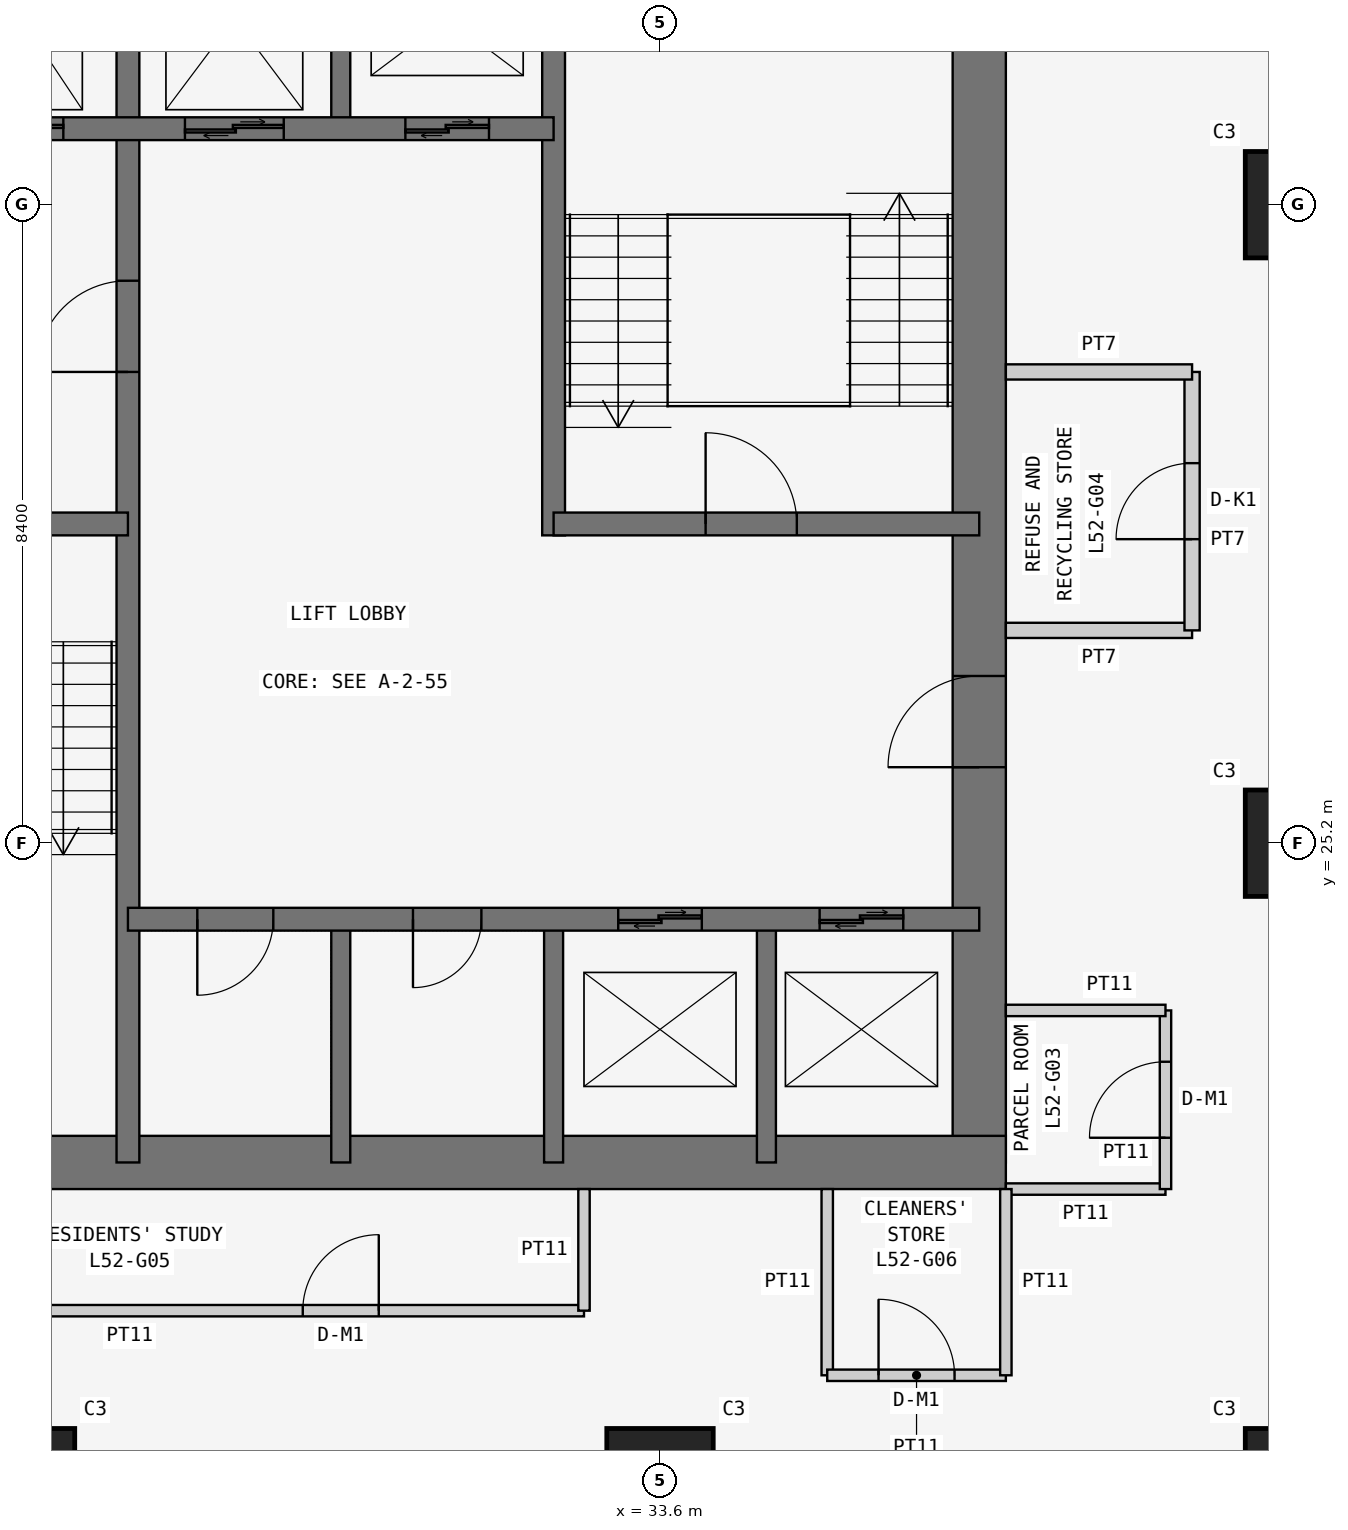
"""IFC4 building model, lengths in metres.
Left out: names, types, materials, properties, quantities, classifications, styles, units other than length and angle.
Written with IfcOpenShell. Run it as: python <this file> out.ifc"""

import sys

from ifc_helpers import new_model, si_unit, direction, frame, frame_2d, origin, origin_2d, place, context, subcontext, project, spatial, rectangle, extrude, element, fill, save


model = new_model("IFC4")
c1 = context("Model", 3, precision=1e-05, world=origin(), true_north=direction((0.0, 1.0)))
c2 = subcontext(c1, "Body", "Model", "MODEL_VIEW")
j1 = project(units=[si_unit("LENGTHUNIT", "METRE"), si_unit("PLANEANGLEUNIT", "RADIAN")], contexts=[c1])
p1 = place(None, origin())
s1 = spatial("IfcSite", under=j1, at=p1, CompositionType="ELEMENT")
p2 = place(p1, origin())
s2 = spatial("IfcBuilding", under=s1, at=p2, CompositionType="ELEMENT")
p3 = place(p2, frame((0.0, 0.0, 201.3)))
s3 = spatial("IfcBuildingStorey", under=s2, at=p3, CompositionType="ELEMENT", Elevation=201.3)
for number, where, z_axis, x_axis in (
    (1, (25.2, 16.8, 0.0), (0.0, 0.0, 1.0), (1.0, 0.0, 0.0)),
    (2, (33.6, 16.8, 0.0), (0.0, 0.0, 1.0), (1.0, 0.0, 0.0)),
    (3, (42.0, 16.8, 0.0), (0.0, 0.0, 1.0), (1.0, 0.0, 0.0)),
    (4, (42.0, 25.2, 0.0), (0.0, 0.0, 1.0), (1.0, 0.0, 0.0)),
    (5, (42.0, 33.6, 0.0), (0.0, 0.0, 1.0), (1.0, 0.0, 0.0)),
):
    element("IfcColumn", number, at=place(p3, frame(where, z_axis=z_axis, x_axis=x_axis)), inside=s3, PredefinedType="COLUMN", context=c2, shape_type="SweptSolid", body=[
        extrude(rectangle(XDim=1.4, YDim=1.4, at=origin_2d()), origin(), (0.0, 0.0, 1.0), 3.6),
    ])
p4 = place(p3, frame((21.0, 21.0, 0.0), z_axis=(0.0, 0.0, 1.0), x_axis=(1.0, 0.0, 0.0)))
e6 = element("IfcWall", 6, at=p4, inside=s3, PredefinedType="SHEAR", context=c2, shape_type="SweptSolid", body=[
    extrude(rectangle(XDim=17.15, YDim=0.7, at=frame_2d((8.575, 0.0))), origin(), (0.0, 0.0, 1.0), 3.6),
])
p5 = place(p3, frame((37.8, 21.0, 0.0), z_axis=(0.0, 0.0, 1.0), x_axis=(0.0, 1.0, 0.0)))
e7 = element("IfcWall", 7, at=p5, inside=s3, PredefinedType="SHEAR", context=c2, shape_type="SweptSolid", body=[
    extrude(rectangle(XDim=17.15, YDim=0.7, at=frame_2d((8.575, 0.0))), origin(), (0.0, 0.0, 1.0), 3.6),
])
p6 = place(p5, frame((5.2, 0.0, 0.0)))
e8 = element("IfcOpeningElement", 8, at=p6, cuts=e7, PredefinedType="OPENING", context=c2, shape_type="SweptSolid", body=[
    extrude(rectangle(XDim=1.2, YDim=2.1, at=frame_2d((0.6, 1.05))), frame((0.0, 0.36, 0.0), z_axis=(0.0, -1.0, 0.0), x_axis=(1.0, 0.0, 0.0)), (0.0, 0.0, 1.0), 0.72),
])
p7 = place(p3, frame((26.6, 21.0, 0.0), z_axis=(0.0, 0.0, 1.0), x_axis=(0.0, 1.0, 0.0)))
e9 = element("IfcWall", 9, at=p7, inside=s3, PredefinedType="SHEAR", context=c2, shape_type="SweptSolid", body=[
    extrude(rectangle(XDim=16.8, YDim=0.3, at=frame_2d((8.4, 0.0))), origin(), (0.0, 0.0, 1.0), 3.6),
])
p8 = place(p7, frame((10.4, 0.0, 0.0)))
e10 = element("IfcOpeningElement", 10, at=p8, cuts=e9, PredefinedType="OPENING", context=c2, shape_type="SweptSolid", body=[
    extrude(rectangle(XDim=1.2, YDim=2.1, at=frame_2d((0.6, 1.05))), frame((0.0, 0.16, 0.0), z_axis=(0.0, -1.0, 0.0), x_axis=(1.0, 0.0, 0.0)), (0.0, 0.0, 1.0), 0.32),
])
p9 = place(p3, frame((21.0, 29.4, 0.0), z_axis=(0.0, 0.0, 1.0), x_axis=(1.0, 0.0, 0.0)))
e11 = element("IfcWall", 11, at=p9, inside=s3, PredefinedType="SHEAR", context=c2, shape_type="SweptSolid", body=[
    extrude(rectangle(XDim=5.6, YDim=0.3, at=frame_2d((2.8, 0.0))), origin(), (0.0, 0.0, 1.0), 3.6),
])
p10 = place(p9, frame((2.3, 0.0, 0.0)))
e12 = element("IfcOpeningElement", 12, at=p10, cuts=e11, PredefinedType="OPENING", context=c2, shape_type="SweptSolid", body=[
    extrude(rectangle(XDim=1.2, YDim=2.1, at=frame_2d((0.6, 1.05))), frame((0.0, 0.16, 0.0), z_axis=(0.0, -1.0, 0.0), x_axis=(1.0, 0.0, 0.0)), (0.0, 0.0, 1.0), 0.32),
])
p11 = place(p3, frame((21.0, 34.6, 0.0), z_axis=(0.0, 0.0, 1.0), x_axis=(1.0, 0.0, 0.0)))
e13 = element("IfcWall", 13, at=p11, inside=s3, PredefinedType="SHEAR", context=c2, shape_type="SweptSolid", body=[
    extrude(rectangle(XDim=11.2, YDim=0.3, at=frame_2d((5.6, 0.0))), origin(), (0.0, 0.0, 1.0), 3.6),
])
p12 = place(p11, frame((9.25, 0.0, 0.0)))
e14 = element("IfcOpeningElement", 14, at=p12, cuts=e13, PredefinedType="OPENING", context=c2, shape_type="SweptSolid", body=[
    extrude(rectangle(XDim=1.1, YDim=2.1, at=frame_2d((0.55, 1.05))), frame((0.0, 0.16, 0.0), z_axis=(0.0, -1.0, 0.0), x_axis=(1.0, 0.0, 0.0)), (0.0, 0.0, 1.0), 0.32),
])
p13 = place(p11, frame((1.0, 0.0, 0.0)))
e15 = element("IfcOpeningElement", 15, at=p13, cuts=e13, PredefinedType="OPENING", context=c2, shape_type="SweptSolid", body=[
    extrude(rectangle(XDim=1.1, YDim=2.1, at=frame_2d((0.55, 1.05))), frame((0.0, 0.16, 0.0), z_axis=(0.0, -1.0, 0.0), x_axis=(1.0, 0.0, 0.0)), (0.0, 0.0, 1.0), 0.32),
])
p14 = place(p11, frame((3.65, 0.0, 0.0)))
e16 = element("IfcOpeningElement", 16, at=p14, cuts=e13, PredefinedType="OPENING", context=c2, shape_type="SweptSolid", body=[
    extrude(rectangle(XDim=1.1, YDim=2.1, at=frame_2d((0.55, 1.05))), frame((0.0, 0.16, 0.0), z_axis=(0.0, -1.0, 0.0), x_axis=(1.0, 0.0, 0.0)), (0.0, 0.0, 1.0), 0.32),
])
p15 = place(p11, frame((6.35, 0.0, 0.0)))
e17 = element("IfcOpeningElement", 17, at=p15, cuts=e13, PredefinedType="OPENING", context=c2, shape_type="SweptSolid", body=[
    extrude(rectangle(XDim=1.3, YDim=2.1, at=frame_2d((0.65, 1.05))), frame((0.0, 0.16, 0.0), z_axis=(0.0, -1.0, 0.0), x_axis=(1.0, 0.0, 0.0)), (0.0, 0.0, 1.0), 0.32),
])
p16 = place(p3, frame((26.6, 24.2, 0.0), z_axis=(0.0, 0.0, 1.0), x_axis=(1.0, 0.0, 0.0)))
e18 = element("IfcWall", 18, at=p16, inside=s3, PredefinedType="SHEAR", context=c2, shape_type="SweptSolid", body=[
    extrude(rectangle(XDim=11.2, YDim=0.3, at=frame_2d((5.6, 0.0))), origin(), (0.0, 0.0, 1.0), 3.6),
])
p17 = place(p16, frame((0.913, 0.0, 0.0)))
e19 = element("IfcOpeningElement", 19, at=p17, cuts=e18, PredefinedType="OPENING", context=c2, shape_type="SweptSolid", body=[
    extrude(rectangle(XDim=1.0, YDim=2.1, at=frame_2d((0.5, 1.05))), frame((0.0, 0.16, 0.0), z_axis=(0.0, -1.0, 0.0), x_axis=(1.0, 0.0, 0.0)), (0.0, 0.0, 1.0), 0.32),
])
p18 = place(p16, frame((3.75, 0.0, 0.0)))
e20 = element("IfcOpeningElement", 20, at=p18, cuts=e18, PredefinedType="OPENING", context=c2, shape_type="SweptSolid", body=[
    extrude(rectangle(XDim=0.9, YDim=2.1, at=frame_2d((0.45, 1.05))), frame((0.0, 0.16, 0.0), z_axis=(0.0, -1.0, 0.0), x_axis=(1.0, 0.0, 0.0)), (0.0, 0.0, 1.0), 0.32),
])
p19 = place(p16, frame((6.45, 0.0, 0.0)))
e21 = element("IfcOpeningElement", 21, at=p19, cuts=e18, PredefinedType="OPENING", context=c2, shape_type="SweptSolid", body=[
    extrude(rectangle(XDim=1.1, YDim=2.1, at=frame_2d((0.55, 1.05))), frame((0.0, 0.16, 0.0), z_axis=(0.0, -1.0, 0.0), x_axis=(1.0, 0.0, 0.0)), (0.0, 0.0, 1.0), 0.32),
])
p20 = place(p16, frame((9.1, 0.0, 0.0)))
e22 = element("IfcOpeningElement", 22, at=p20, cuts=e18, PredefinedType="OPENING", context=c2, shape_type="SweptSolid", body=[
    extrude(rectangle(XDim=1.1, YDim=2.1, at=frame_2d((0.55, 1.05))), frame((0.0, 0.16, 0.0), z_axis=(0.0, -1.0, 0.0), x_axis=(1.0, 0.0, 0.0)), (0.0, 0.0, 1.0), 0.32),
])
p21 = place(p3, frame((32.2, 29.25, 0.0), z_axis=(0.0, 0.0, 1.0), x_axis=(0.0, 1.0, 0.0)))
e23 = element("IfcWall", 23, at=p21, inside=s3, PredefinedType="SHEAR", context=c2, shape_type="SweptSolid", body=[
    extrude(rectangle(XDim=8.55, YDim=0.3, at=frame_2d((4.275, 0.0))), origin(), (0.0, 0.0, 1.0), 3.6),
])
p22 = place(p3, frame((32.2, 29.4, 0.0), z_axis=(0.0, 0.0, 1.0), x_axis=(1.0, 0.0, 0.0)))
e24 = element("IfcWall", 24, at=p22, inside=s3, PredefinedType="SHEAR", context=c2, shape_type="SweptSolid", body=[
    extrude(rectangle(XDim=5.6, YDim=0.3, at=frame_2d((2.8, 0.0))), origin(), (0.0, 0.0, 1.0), 3.6),
])
p23 = place(p22, frame((2.0, 0.0, 0.0)))
e25 = element("IfcOpeningElement", 25, at=p23, cuts=e24, PredefinedType="OPENING", context=c2, shape_type="SweptSolid", body=[
    extrude(rectangle(XDim=1.2, YDim=2.1, at=frame_2d((0.6, 1.05))), frame((0.0, 0.16, 0.0), z_axis=(0.0, -1.0, 0.0), x_axis=(1.0, 0.0, 0.0)), (0.0, 0.0, 1.0), 0.32),
])
for number, where, z_axis, x_axis in (
    (26, (29.4, 21.0, 0.0), (0.0, 0.0, 1.0), (0.0, 1.0, 0.0)),
    (27, (32.2, 21.0, 0.0), (0.0, 0.0, 1.0), (0.0, 1.0, 0.0)),
    (28, (35.0, 21.0, 0.0), (0.0, 0.0, 1.0), (0.0, 1.0, 0.0)),
    (29, (29.4, 34.6, 0.0), (0.0, 0.0, 1.0), (0.0, 1.0, 0.0)),
):
    element("IfcWall", number, at=place(p3, frame(where, z_axis=z_axis, x_axis=x_axis)), inside=s3, PredefinedType="SHEAR", context=c2, shape_type="SweptSolid", body=[
        extrude(rectangle(XDim=3.2, YDim=0.25, at=frame_2d((1.6, 0.0))), origin(), (0.0, 0.0, 1.0), 3.6),
    ])
p24 = place(p3, frame((38.15, 20.65, 0.0), z_axis=(0.0, 0.0, 1.0), x_axis=(1.0, 0.0, 0.0)))
e30 = element("IfcWall", 30, at=p24, inside=s3, PredefinedType="PARTITIONING", context=c2, shape_type="SweptSolid", body=[
    extrude(rectangle(XDim=2.1, YDim=0.15, at=frame_2d((1.05, 0.0))), origin(), (0.0, 0.0, 1.0), 3.45),
])
p25 = place(p3, frame((40.25, 20.65, 0.0), z_axis=(0.0, 0.0, 1.0), x_axis=(0.0, 1.0, 0.0)))
e31 = element("IfcWall", 31, at=p25, inside=s3, PredefinedType="PARTITIONING", context=c2, shape_type="SweptSolid", body=[
    extrude(rectangle(XDim=2.35, YDim=0.15, at=frame_2d((1.175, 0.0))), origin(), (0.0, 0.0, 1.0), 3.45),
])
p26 = place(p25, frame((0.675, 0.0, 0.0)))
e32 = element("IfcOpeningElement", 32, at=p26, cuts=e31, PredefinedType="OPENING", context=c2, shape_type="SweptSolid", body=[
    extrude(rectangle(XDim=1.0, YDim=2.1, at=frame_2d((0.5, 1.05))), frame((0.0, 0.085, 0.0), z_axis=(0.0, -1.0, 0.0), x_axis=(1.0, 0.0, 0.0)), (0.0, 0.0, 1.0), 0.17),
])
p27 = place(p3, frame((40.25, 23.0, 0.0), z_axis=(0.0, 0.0, 1.0), x_axis=(-1.0, 0.0, 0.0)))
e33 = element("IfcWall", 33, at=p27, inside=s3, PredefinedType="PARTITIONING", context=c2, shape_type="SweptSolid", body=[
    extrude(rectangle(XDim=2.1, YDim=0.15, at=frame_2d((1.05, 0.0))), origin(), (0.0, 0.0, 1.0), 3.45),
])
p28 = place(p3, frame((38.15, 28.0, 0.0), z_axis=(0.0, 0.0, 1.0), x_axis=(1.0, 0.0, 0.0)))
e34 = element("IfcWall", 34, at=p28, inside=s3, PredefinedType="PARTITIONING", context=c2, shape_type="SweptSolid", body=[
    extrude(rectangle(XDim=2.45, YDim=0.2, at=frame_2d((1.225, 0.0))), origin(), (0.0, 0.0, 1.0), 3.45),
])
p29 = place(p3, frame((40.6, 28.0, 0.0), z_axis=(0.0, 0.0, 1.0), x_axis=(0.0, 1.0, 0.0)))
e35 = element("IfcWall", 35, at=p29, inside=s3, PredefinedType="PARTITIONING", context=c2, shape_type="SweptSolid", body=[
    extrude(rectangle(XDim=3.4, YDim=0.2, at=frame_2d((1.7, 0.0))), origin(), (0.0, 0.0, 1.0), 3.45),
])
p30 = place(p29, frame((1.2, 0.0, 0.0)))
e36 = element("IfcOpeningElement", 36, at=p30, cuts=e35, PredefinedType="OPENING", context=c2, shape_type="SweptSolid", body=[
    extrude(rectangle(XDim=1.0, YDim=2.1, at=frame_2d((0.5, 1.05))), frame((0.0, 0.11, 0.0), z_axis=(0.0, -1.0, 0.0), x_axis=(1.0, 0.0, 0.0)), (0.0, 0.0, 1.0), 0.22),
])
p31 = place(p3, frame((40.6, 31.4, 0.0), z_axis=(0.0, 0.0, 1.0), x_axis=(-1.0, 0.0, 0.0)))
e37 = element("IfcWall", 37, at=p31, inside=s3, PredefinedType="PARTITIONING", context=c2, shape_type="SweptSolid", body=[
    extrude(rectangle(XDim=2.45, YDim=0.2, at=frame_2d((1.225, 0.0))), origin(), (0.0, 0.0, 1.0), 3.45),
])
p32 = place(p3, frame((20.65, 19.05, 0.0), z_axis=(0.0, 0.0, 1.0), x_axis=(1.0, 0.0, 0.0)))
e38 = element("IfcWall", 38, at=p32, inside=s3, PredefinedType="PARTITIONING", context=c2, shape_type="SweptSolid", body=[
    extrude(rectangle(XDim=11.95, YDim=0.15, at=frame_2d((5.975, 0.0))), origin(), (0.0, 0.0, 1.0), 3.45),
])
p33 = place(p32, frame((8.25, 0.0, 0.0)))
e39 = element("IfcOpeningElement", 39, at=p33, cuts=e38, PredefinedType="OPENING", context=c2, shape_type="SweptSolid", body=[
    extrude(rectangle(XDim=1.0, YDim=2.1, at=frame_2d((0.5, 1.05))), frame((0.0, 0.085, 0.0), z_axis=(0.0, -1.0, 0.0), x_axis=(1.0, 0.0, 0.0)), (0.0, 0.0, 1.0), 0.17),
])
p34 = place(p3, frame((32.6, 19.05, 0.0), z_axis=(0.0, 0.0, 1.0), x_axis=(0.0, 1.0, 0.0)))
e40 = element("IfcWall", 40, at=p34, inside=s3, PredefinedType="PARTITIONING", context=c2, shape_type="SweptSolid", body=[
    extrude(rectangle(XDim=1.6, YDim=0.15, at=frame_2d((0.8, 0.0))), origin(), (0.0, 0.0, 1.0), 3.45),
])
p35 = place(p3, frame((35.8, 20.65, 0.0), z_axis=(0.0, 0.0, 1.0), x_axis=(0.0, -1.0, 0.0)))
e41 = element("IfcWall", 41, at=p35, inside=s3, PredefinedType="PARTITIONING", context=c2, shape_type="SweptSolid", body=[
    extrude(rectangle(XDim=2.45, YDim=0.15, at=frame_2d((1.225, 0.0))), origin(), (0.0, 0.0, 1.0), 3.45),
])
p36 = place(p3, frame((35.8, 18.2, 0.0), z_axis=(0.0, 0.0, 1.0), x_axis=(1.0, 0.0, 0.0)))
e42 = element("IfcWall", 42, at=p36, inside=s3, PredefinedType="PARTITIONING", context=c2, shape_type="SweptSolid", body=[
    extrude(rectangle(XDim=2.35, YDim=0.15, at=frame_2d((1.175, 0.0))), origin(), (0.0, 0.0, 1.0), 3.45),
])
p37 = place(p36, frame((0.675, 0.0, 0.0)))
e43 = element("IfcOpeningElement", 43, at=p37, cuts=e42, PredefinedType="OPENING", context=c2, shape_type="SweptSolid", body=[
    extrude(rectangle(XDim=1.0, YDim=2.1, at=frame_2d((0.5, 1.05))), frame((0.0, 0.085, 0.0), z_axis=(0.0, -1.0, 0.0), x_axis=(1.0, 0.0, 0.0)), (0.0, 0.0, 1.0), 0.17),
])
p38 = place(p3, frame((38.15, 18.2, 0.0), z_axis=(0.0, 0.0, 1.0), x_axis=(0.0, 1.0, 0.0)))
e44 = element("IfcWall", 44, at=p38, inside=s3, PredefinedType="PARTITIONING", context=c2, shape_type="SweptSolid", body=[
    extrude(rectangle(XDim=2.45, YDim=0.15, at=frame_2d((1.225, 0.0))), origin(), (0.0, 0.0, 1.0), 3.45),
])
p39 = place(p26, origin())
e45 = element("IfcDoor", 45, at=p39, inside=s3, OperationType="SINGLE_SWING_LEFT", PredefinedType="DOOR", context=c2, shape_type="SweptSolid", body=[
    extrude(rectangle(XDim=1.0, YDim=2.1, at=frame_2d((0.5, 1.05))), frame((0.0, 0.025, 0.0), z_axis=(0.0, -1.0, 0.0), x_axis=(1.0, 0.0, 0.0)), (0.0, 0.0, 1.0), 0.05),
])
fill(e32, e45)
p40 = place(p30, origin())
e46 = element("IfcDoor", 46, at=p40, inside=s3, OperationType="SINGLE_SWING_LEFT", PredefinedType="DOOR", context=c2, shape_type="SweptSolid", body=[
    extrude(rectangle(XDim=1.0, YDim=2.1, at=frame_2d((0.5, 1.05))), frame((0.0, 0.025, 0.0), z_axis=(0.0, -1.0, 0.0), x_axis=(1.0, 0.0, 0.0)), (0.0, 0.0, 1.0), 0.05),
])
fill(e36, e46)
p41 = place(p33, origin())
e47 = element("IfcDoor", 47, at=p41, inside=s3, OperationType="SINGLE_SWING_RIGHT", PredefinedType="DOOR", context=c2, shape_type="SweptSolid", body=[
    extrude(rectangle(XDim=1.0, YDim=2.1, at=frame_2d((0.5, 1.05))), frame((0.0, 0.025, 0.0), z_axis=(0.0, -1.0, 0.0), x_axis=(1.0, 0.0, 0.0)), (0.0, 0.0, 1.0), 0.05),
])
fill(e39, e47)
p42 = place(p37, origin())
e48 = element("IfcDoor", 48, at=p42, inside=s3, OperationType="SINGLE_SWING_LEFT", PredefinedType="DOOR", context=c2, shape_type="SweptSolid", body=[
    extrude(rectangle(XDim=1.0, YDim=2.1, at=frame_2d((0.5, 1.05))), frame((0.0, 0.025, 0.0), z_axis=(0.0, -1.0, 0.0), x_axis=(1.0, 0.0, 0.0)), (0.0, 0.0, 1.0), 0.05),
])
fill(e43, e48)
p43 = place(p8, origin())
e49 = element("IfcDoor", 49, at=p43, inside=s3, OperationType="SINGLE_SWING_LEFT", PredefinedType="DOOR", context=c2, shape_type="SweptSolid", body=[
    extrude(rectangle(XDim=1.2, YDim=2.1, at=frame_2d((0.6, 1.05))), frame((0.0, 0.025, 0.0), z_axis=(0.0, -1.0, 0.0), x_axis=(1.0, 0.0, 0.0)), (0.0, 0.0, 1.0), 0.05),
])
fill(e10, e49)
p44 = place(p6, origin())
e50 = element("IfcDoor", 50, at=p44, inside=s3, OperationType="SINGLE_SWING_LEFT", PredefinedType="DOOR", context=c2, shape_type="SweptSolid", body=[
    extrude(rectangle(XDim=1.2, YDim=2.1, at=frame_2d((0.6, 1.05))), frame((0.0, 0.025, 0.0), z_axis=(0.0, -1.0, 0.0), x_axis=(1.0, 0.0, 0.0)), (0.0, 0.0, 1.0), 0.05),
])
fill(e8, e50)
p45 = place(p23, origin())
e51 = element("IfcDoor", 51, at=p45, inside=s3, OperationType="SINGLE_SWING_LEFT", PredefinedType="DOOR", context=c2, shape_type="SweptSolid", body=[
    extrude(rectangle(XDim=1.2, YDim=2.1, at=frame_2d((0.6, 1.05))), frame((0.0, 0.025, 0.0), z_axis=(0.0, -1.0, 0.0), x_axis=(1.0, 0.0, 0.0)), (0.0, 0.0, 1.0), 0.05),
])
fill(e25, e51)
p46 = place(p17, frame((1.0, 0.0, 0.0), z_axis=(0.0, 0.0, 1.0), x_axis=(-1.0, 0.0, 0.0)))
e52 = element("IfcDoor", 52, at=p46, inside=s3, OperationType="SINGLE_SWING_RIGHT", PredefinedType="DOOR", context=c2, shape_type="SweptSolid", body=[
    extrude(rectangle(XDim=1.0, YDim=2.1, at=frame_2d((0.5, 1.05))), frame((0.0, 0.025, 0.0), z_axis=(0.0, -1.0, 0.0), x_axis=(1.0, 0.0, 0.0)), (0.0, 0.0, 1.0), 0.05),
])
fill(e19, e52)
p47 = place(p18, frame((0.9, 0.0, 0.0), z_axis=(0.0, 0.0, 1.0), x_axis=(-1.0, 0.0, 0.0)))
e53 = element("IfcDoor", 53, at=p47, inside=s3, OperationType="SINGLE_SWING_RIGHT", PredefinedType="DOOR", context=c2, shape_type="SweptSolid", body=[
    extrude(rectangle(XDim=0.9, YDim=2.1, at=frame_2d((0.45, 1.05))), frame((0.0, 0.025, 0.0), z_axis=(0.0, -1.0, 0.0), x_axis=(1.0, 0.0, 0.0)), (0.0, 0.0, 1.0), 0.05),
])
fill(e20, e53)
p48 = place(p19, origin())
e54 = element("IfcDoor", 54, at=p48, inside=s3, OperationType="DOUBLE_DOOR_SLIDING", PredefinedType="DOOR", context=c2, shape_type="SweptSolid", body=[
    extrude(rectangle(XDim=1.1, YDim=2.1, at=frame_2d((0.55, 1.05))), frame((0.0, 0.025, 0.0), z_axis=(0.0, -1.0, 0.0), x_axis=(1.0, 0.0, 0.0)), (0.0, 0.0, 1.0), 0.05),
])
fill(e21, e54)
p49 = place(p20, origin())
e55 = element("IfcDoor", 55, at=p49, inside=s3, OperationType="DOUBLE_DOOR_SLIDING", PredefinedType="DOOR", context=c2, shape_type="SweptSolid", body=[
    extrude(rectangle(XDim=1.1, YDim=2.1, at=frame_2d((0.55, 1.05))), frame((0.0, 0.025, 0.0), z_axis=(0.0, -1.0, 0.0), x_axis=(1.0, 0.0, 0.0)), (0.0, 0.0, 1.0), 0.05),
])
fill(e22, e55)
p50 = place(p12, origin())
e56 = element("IfcDoor", 56, at=p50, inside=s3, OperationType="DOUBLE_DOOR_SLIDING", PredefinedType="DOOR", context=c2, shape_type="SweptSolid", body=[
    extrude(rectangle(XDim=1.1, YDim=2.1, at=frame_2d((0.55, 1.05))), frame((0.0, 0.025, 0.0), z_axis=(0.0, -1.0, 0.0), x_axis=(1.0, 0.0, 0.0)), (0.0, 0.0, 1.0), 0.05),
])
fill(e14, e56)
p51 = place(p14, origin())
e57 = element("IfcDoor", 57, at=p51, inside=s3, OperationType="DOUBLE_DOOR_SLIDING", PredefinedType="DOOR", context=c2, shape_type="SweptSolid", body=[
    extrude(rectangle(XDim=1.1, YDim=2.1, at=frame_2d((0.55, 1.05))), frame((0.0, 0.025, 0.0), z_axis=(0.0, -1.0, 0.0), x_axis=(1.0, 0.0, 0.0)), (0.0, 0.0, 1.0), 0.05),
])
fill(e16, e57)
p52 = place(p15, origin())
e58 = element("IfcDoor", 58, at=p52, inside=s3, OperationType="DOUBLE_DOOR_SLIDING", PredefinedType="DOOR", context=c2, shape_type="SweptSolid", body=[
    extrude(rectangle(XDim=1.3, YDim=2.1, at=frame_2d((0.65, 1.05))), frame((0.0, 0.025, 0.0), z_axis=(0.0, -1.0, 0.0), x_axis=(1.0, 0.0, 0.0)), (0.0, 0.0, 1.0), 0.05),
])
fill(e17, e58)
save(model, sys.argv[1])
